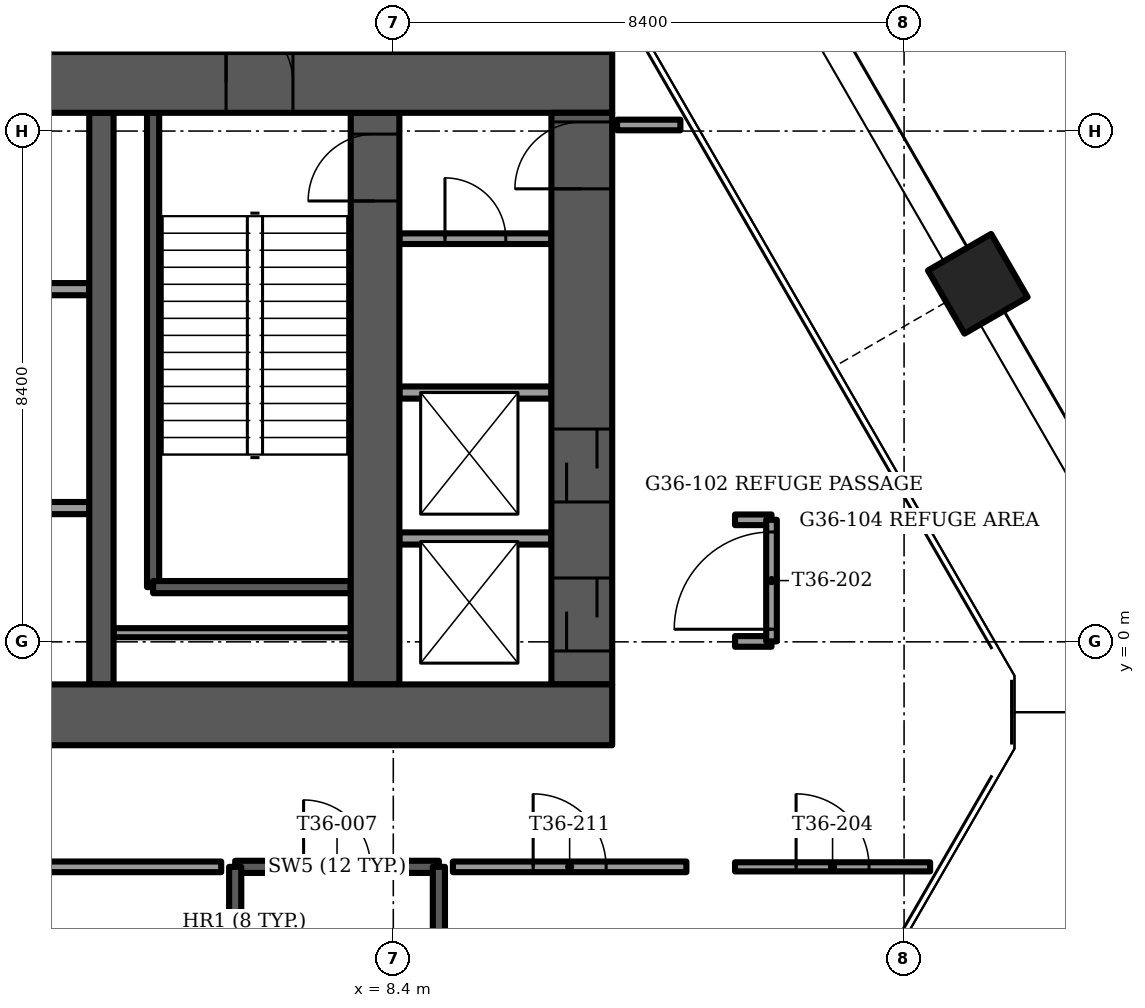
"""IFC4 building model, lengths in metres.
Left out: names, types, materials, properties, quantities, classifications, styles, units other than length and angle.
Written with IfcOpenShell. Run it as: python <this file> out.ifc"""

import sys

from ifc_helpers import new_model, si_unit, direction, frame, frame_2d, origin, origin_2d, place, context, subcontext, project, spatial, rectangle, extrude, element, fill, save


model = new_model("IFC4")
c1 = context("Model", 3, precision=1e-05, world=origin(), true_north=direction((0.0, 1.0)))
c2 = subcontext(c1, "Body", "Model", "MODEL_VIEW")
j1 = project(units=[si_unit("LENGTHUNIT", "METRE"), si_unit("PLANEANGLEUNIT", "RADIAN")], contexts=[c1])
p1 = place(None, origin())
s1 = spatial("IfcSite", under=j1, at=p1, CompositionType="ELEMENT")
p2 = place(p1, origin())
s2 = spatial("IfcBuilding", under=s1, at=p2, CompositionType="ELEMENT")
p3 = place(p2, frame((0.0, 0.0, 146.0)))
s3 = spatial("IfcBuildingStorey", under=s2, at=p3, CompositionType="ELEMENT", Elevation=146.0)
p4 = place(p3, frame((18.012, 5.888, -1.2), z_axis=(0.0, 0.0, 1.0), x_axis=(0.5, -0.866025403784, 0.0)))
e1 = element("IfcColumn", 1, at=p4, inside=s3, PredefinedType="COLUMN", context=c2, shape_type="SweptSolid", body=[
    extrude(rectangle(XDim=1.2, YDim=1.2, at=origin_2d()), origin(), (0.0, 0.0, 1.0), 5.0),
])
p5 = place(p3, frame((-12.0, -1.2, -0.3), z_axis=(0.0, 0.0, 1.0), x_axis=(1.0, 0.0, 0.0)))
e2 = element("IfcWall", 2, at=p5, inside=s3, PredefinedType="SHEAR", context=c2, shape_type="SweptSolid", body=[
    extrude(rectangle(XDim=24.0, YDim=1.0, at=frame_2d((12.0, 0.0))), origin(), (0.0, 0.0, 1.0), 5.0),
])
p6 = place(p5, frame((11.2, 0.0, 0.0)))
e3 = element("IfcOpeningElement", 3, at=p6, cuts=e2, PredefinedType="OPENING", context=c2, shape_type="SweptSolid", body=[
    extrude(rectangle(XDim=1.6, YDim=2.1, at=frame_2d((0.8, 1.05))), frame((0.0, 0.5, 0.0), z_axis=(0.0, -1.0, 0.0), x_axis=(1.0, 0.0, 0.0)), (0.0, 0.0, 1.0), 1.0),
])
p7 = place(p3, frame((-12.0, 9.2, -0.3), z_axis=(0.0, 0.0, 1.0), x_axis=(1.0, 0.0, 0.0)))
e4 = element("IfcWall", 4, at=p7, inside=s3, PredefinedType="SHEAR", context=c2, shape_type="SweptSolid", body=[
    extrude(rectangle(XDim=24.0, YDim=1.0, at=frame_2d((12.0, 0.0))), origin(), (0.0, 0.0, 1.0), 5.0),
])
p8 = place(p7, frame((11.2, 0.0, 0.0)))
e5 = element("IfcOpeningElement", 5, at=p8, cuts=e4, PredefinedType="OPENING", context=c2, shape_type="SweptSolid", body=[
    extrude(rectangle(XDim=1.6, YDim=2.1, at=frame_2d((0.8, 1.05))), frame((0.0, 0.5, 0.0), z_axis=(0.0, -1.0, 0.0), x_axis=(1.0, 0.0, 0.0)), (0.0, 0.0, 1.0), 1.0),
])
p9 = place(p7, frame((5.25, 0.0, 0.0)))
e6 = element("IfcOpeningElement", 6, at=p9, cuts=e4, PredefinedType="OPENING", context=c2, shape_type="SweptSolid", body=[
    extrude(rectangle(XDim=1.1, YDim=2.1, at=frame_2d((0.55, 1.05))), frame((0.0, 0.5, 0.0), z_axis=(0.0, -1.0, 0.0), x_axis=(1.0, 0.0, 0.0)), (0.0, 0.0, 1.0), 1.0),
])
p10 = place(p7, frame((17.65, 0.0, 0.0)))
e7 = element("IfcOpeningElement", 7, at=p10, cuts=e4, PredefinedType="OPENING", context=c2, shape_type="SweptSolid", body=[
    extrude(rectangle(XDim=1.1, YDim=2.1, at=frame_2d((0.55, 1.05))), frame((0.0, 0.5, 0.0), z_axis=(0.0, -1.0, 0.0), x_axis=(1.0, 0.0, 0.0)), (0.0, 0.0, 1.0), 1.0),
])
p11 = place(p3, frame((8.1, -0.7, -0.3), z_axis=(0.0, 0.0, 1.0), x_axis=(0.0, 1.0, 0.0)))
e8 = element("IfcWall", 8, at=p11, inside=s3, PredefinedType="SHEAR", context=c2, shape_type="SweptSolid", body=[
    extrude(rectangle(XDim=9.4, YDim=0.8, at=frame_2d((4.7, 0.0))), origin(), (0.0, 0.0, 1.0), 5.0),
])
p12 = place(p11, frame((7.95, 0.0, 0.0)))
e9 = element("IfcOpeningElement", 9, at=p12, cuts=e8, PredefinedType="OPENING", context=c2, shape_type="SweptSolid", body=[
    extrude(rectangle(XDim=1.1, YDim=2.1, at=frame_2d((0.55, 1.05))), frame((0.0, 0.4, 0.0), z_axis=(0.0, -1.0, 0.0), x_axis=(1.0, 0.0, 0.0)), (0.0, 0.0, 1.0), 0.8),
])
p13 = place(p3, frame((3.6, -0.7, -0.3), z_axis=(0.0, 0.0, 1.0), x_axis=(0.0, 1.0, 0.0)))
e10 = element("IfcWall", 10, at=p13, inside=s3, PredefinedType="SHEAR", context=c2, shape_type="SweptSolid", body=[
    extrude(rectangle(XDim=9.4, YDim=0.4, at=frame_2d((4.7, 0.0))), origin(), (0.0, 0.0, 1.0), 5.0),
])
p14 = place(p3, frame((11.5, -0.7, -0.3), z_axis=(0.0, 0.0, 1.0), x_axis=(0.0, 1.0, 0.0)))
e11 = element("IfcWall", 11, at=p14, inside=s3, PredefinedType="SHEAR", context=c2, shape_type="SweptSolid", body=[
    extrude(rectangle(XDim=9.4, YDim=1.0, at=frame_2d((4.7, 0.0))), origin(), (0.0, 0.0, 1.0), 5.0),
])
p15 = place(p14, frame((8.15, 0.0, 0.0)))
e12 = element("IfcOpeningElement", 12, at=p15, cuts=e11, PredefinedType="OPENING", context=c2, shape_type="SweptSolid", body=[
    extrude(rectangle(XDim=1.1, YDim=2.1, at=frame_2d((0.55, 1.05))), frame((0.0, 0.5, 0.0), z_axis=(0.0, -1.0, 0.0), x_axis=(1.0, 0.0, 0.0)), (0.0, 0.0, 1.0), 1.0),
])
p16 = place(p14, frame((0.55, 0.0, 0.0)))
e13 = element("IfcOpeningElement", 13, at=p16, cuts=e11, PredefinedType="OPENING", context=c2, shape_type="SweptSolid", body=[
    extrude(rectangle(XDim=1.2, YDim=2.1, at=frame_2d((0.6, 1.05))), frame((0.0, 0.5, 0.0), z_axis=(0.0, -1.0, 0.0), x_axis=(1.0, 0.0, 0.0)), (0.0, 0.0, 1.0), 1.0),
])
p17 = place(p14, frame((3.0, 0.0, 0.0)))
e14 = element("IfcOpeningElement", 14, at=p17, cuts=e11, PredefinedType="OPENING", context=c2, shape_type="SweptSolid", body=[
    extrude(rectangle(XDim=1.2, YDim=2.1, at=frame_2d((0.6, 1.05))), frame((0.0, 0.5, 0.0), z_axis=(0.0, -1.0, 0.0), x_axis=(1.0, 0.0, 0.0)), (0.0, 0.0, 1.0), 1.0),
])
for number, where, z_axis, x_axis in (
    (15, (1.1, 2.2, 0.0), (0.0, 0.0, 1.0), (1.0, 0.0, 0.0)),
    (16, (1.1, 5.8, 0.0), (0.0, 0.0, 1.0), (1.0, 0.0, 0.0)),
):
    element("IfcWall", number, at=place(p3, frame(where, z_axis=z_axis, x_axis=x_axis)), inside=s3, PredefinedType="PARTITIONING", context=c2, shape_type="SweptSolid", body=[
        extrude(rectangle(XDim=2.3, YDim=0.2, at=frame_2d((1.15, 0.0))), origin(), (0.0, 0.0, 1.0), 4.7),
    ])
p18 = place(p3, frame((4.45, 0.9, -0.3), z_axis=(0.0, 0.0, 1.0), x_axis=(0.0, 1.0, 0.0)))
e17 = element("IfcWall", 17, at=p18, inside=s3, PredefinedType="SOLIDWALL", context=c2, shape_type="SweptSolid", body=[
    extrude(rectangle(XDim=7.8, YDim=0.2, at=frame_2d((3.9, 0.0))), origin(), (0.0, 0.0, 1.0), 5.0),
])
p19 = place(p3, frame((4.45, 0.9, -0.3), z_axis=(0.0, 0.0, 1.0), x_axis=(1.0, 0.0, 0.0)))
e18 = element("IfcWall", 18, at=p19, inside=s3, PredefinedType="SOLIDWALL", context=c2, shape_type="SweptSolid", body=[
    extrude(rectangle(XDim=3.25, YDim=0.2, at=frame_2d((1.625, 0.0))), origin(), (0.0, 0.0, 1.0), 5.0),
])
p20 = place(p3, frame((3.8, 0.15, 0.0), z_axis=(0.0, 0.0, 1.0), x_axis=(1.0, 0.0, 0.0)))
e19 = element("IfcWall", 19, at=p20, inside=s3, PredefinedType="PARTITIONING", context=c2, shape_type="SweptSolid", body=[
    extrude(rectangle(XDim=3.9, YDim=0.15, at=frame_2d((1.95, 0.0))), origin(), (0.0, 0.0, 1.0), 4.7),
])
p21 = place(p3, frame((5.8, -3.7, -0.3), z_axis=(0.0, 0.0, 1.0), x_axis=(1.0, 0.0, 0.0)))
e20 = element("IfcWall", 20, at=p21, inside=s3, PredefinedType="SOLIDWALL", context=c2, shape_type="SweptSolid", body=[
    extrude(rectangle(XDim=3.35, YDim=0.2, at=frame_2d((1.675, 0.0))), origin(), (0.0, 0.0, 1.0), 5.0),
])
p22 = place(p21, frame((1.125, 0.0, 0.0)))
e21 = element("IfcOpeningElement", 21, at=p22, cuts=e20, PredefinedType="OPENING", context=c2, shape_type="SweptSolid", body=[
    extrude(rectangle(XDim=1.1, YDim=2.1, at=frame_2d((0.55, 1.05))), frame((0.0, 0.1, 0.0), z_axis=(0.0, -1.0, 0.0), x_axis=(1.0, 0.0, 0.0)), (0.0, 0.0, 1.0), 0.2),
])
for number, where, z_axis, x_axis in (
    (22, (5.8, -3.7, -0.3), (0.0, 0.0, 1.0), (0.0, -1.0, 0.0)),
    (23, (9.15, -3.7, -0.3), (0.0, 0.0, 1.0), (0.0, -1.0, 0.0)),
):
    element("IfcWall", number, at=place(p3, frame(where, z_axis=z_axis, x_axis=x_axis)), inside=s3, PredefinedType="SOLIDWALL", context=c2, shape_type="SweptSolid", body=[
        extrude(rectangle(XDim=7.7, YDim=0.2, at=frame_2d((3.85, 0.0))), origin(), (0.0, 0.0, 1.0), 5.0),
    ])
for number, where, z_axis, x_axis in (
    (24, (8.5, 1.7, 0.0), (0.0, 0.0, 1.0), (1.0, 0.0, 0.0)),
    (25, (8.5, 4.1, 0.0), (0.0, 0.0, 1.0), (1.0, 0.0, 0.0)),
):
    element("IfcWall", number, at=place(p3, frame(where, z_axis=z_axis, x_axis=x_axis)), inside=s3, PredefinedType="PARTITIONING", context=c2, shape_type="SweptSolid", body=[
        extrude(rectangle(XDim=2.5, YDim=0.2, at=frame_2d((1.25, 0.0))), origin(), (0.0, 0.0, 1.0), 4.7),
    ])
p23 = place(p3, frame((8.5, 6.63, 0.0), z_axis=(0.0, 0.0, 1.0), x_axis=(1.0, 0.0, 0.0)))
e26 = element("IfcWall", 26, at=p23, inside=s3, PredefinedType="PARTITIONING", context=c2, shape_type="SweptSolid", body=[
    extrude(rectangle(XDim=2.5, YDim=0.175, at=frame_2d((1.25, 0.0))), origin(), (0.0, 0.0, 1.0), 4.7),
])
p24 = place(p23, frame((0.75, 0.0, 0.0)))
e27 = element("IfcOpeningElement", 27, at=p24, cuts=e26, PredefinedType="OPENING", context=c2, shape_type="SweptSolid", body=[
    extrude(rectangle(XDim=1.0, YDim=2.1, at=frame_2d((0.5, 1.05))), frame((0.0, 0.087, 0.0), z_axis=(0.0, -1.0, 0.0), x_axis=(1.0, 0.0, 0.0)), (0.0, 0.0, 1.0), 0.175),
])
p25 = place(p3, frame((-5.57, -3.7, 0.0), z_axis=(0.0, 0.0, 1.0), x_axis=(1.0, 0.0, 0.0)))
e28 = element("IfcWall", 28, at=p25, inside=s3, PredefinedType="PARTITIONING", context=c2, shape_type="SweptSolid", body=[
    extrude(rectangle(XDim=11.14, YDim=0.175, at=frame_2d((5.57, 0.0))), origin(), (0.0, 0.0, 1.0), 4.7),
])
p26 = place(p25, frame((4.77, 0.0, 0.0)))
e29 = element("IfcOpeningElement", 29, at=p26, cuts=e28, PredefinedType="OPENING", context=c2, shape_type="SweptSolid", body=[
    extrude(rectangle(XDim=1.6, YDim=2.1, at=frame_2d((0.8, 1.05))), frame((0.0, 0.087, 0.0), z_axis=(0.0, -1.0, 0.0), x_axis=(1.0, 0.0, 0.0)), (0.0, 0.0, 1.0), 0.175),
])
p27 = place(p3, frame((9.38, -3.7, 0.0), z_axis=(0.0, 0.0, 1.0), x_axis=(1.0, 0.0, 0.0)))
e30 = element("IfcWall", 30, at=p27, inside=s3, PredefinedType="PARTITIONING", context=c2, shape_type="SweptSolid", body=[
    extrude(rectangle(XDim=3.84, YDim=0.175, at=frame_2d((1.92, 0.0))), origin(), (0.0, 0.0, 1.0), 4.7),
])
p28 = place(p27, frame((1.32, 0.0, 0.0)))
e31 = element("IfcOpeningElement", 31, at=p28, cuts=e30, PredefinedType="OPENING", context=c2, shape_type="SweptSolid", body=[
    extrude(rectangle(XDim=1.2, YDim=2.1, at=frame_2d((0.6, 1.05))), frame((0.0, 0.087, 0.0), z_axis=(0.0, -1.0, 0.0), x_axis=(1.0, 0.0, 0.0)), (0.0, 0.0, 1.0), 0.175),
])
for number, where, z_axis, x_axis in (
    (32, (14.02, 0.007, 0.0), (0.0, 0.0, 1.0), (1.0, 0.0, 0.0)),
    (33, (14.02, 2.007, 0.0), (0.0, 0.0, 1.0), (1.0, 0.0, 0.0)),
):
    element("IfcWall", number, at=place(p3, frame(where, z_axis=z_axis, x_axis=x_axis)), inside=s3, PredefinedType="PARTITIONING", context=c2, shape_type="SweptSolid", body=[
        extrude(rectangle(XDim=0.6, YDim=0.175, at=frame_2d((0.3, 0.0))), origin(), (0.0, 0.0, 1.0), 4.7),
    ])
p29 = place(p3, frame((12.08, 8.5, 0.0), z_axis=(0.0, 0.0, 1.0), x_axis=(1.0, 0.0, 0.0)))
e34 = element("IfcWall", 34, at=p29, inside=s3, PredefinedType="PARTITIONING", context=c2, shape_type="SweptSolid", body=[
    extrude(rectangle(XDim=1.042, YDim=0.175, at=frame_2d((0.521, 0.0))), origin(), (0.0, 0.0, 1.0), 4.7),
])
p30 = place(p3, frame((14.62, 0.007, 0.0), z_axis=(0.0, 0.0, 1.0), x_axis=(0.0, 1.0, 0.0)))
e35 = element("IfcWall", 35, at=p30, inside=s3, PredefinedType="PARTITIONING", context=c2, shape_type="SweptSolid", body=[
    extrude(rectangle(XDim=2.0, YDim=0.175, at=frame_2d((1.0, 0.0))), origin(), (0.0, 0.0, 1.0), 4.7),
])
p31 = place(p30, frame((0.2, 0.0, 0.0)))
e36 = element("IfcOpeningElement", 36, at=p31, cuts=e35, PredefinedType="OPENING", context=c2, shape_type="SweptSolid", body=[
    extrude(rectangle(XDim=1.6, YDim=2.1, at=frame_2d((0.8, 1.05))), frame((0.0, 0.087, 0.0), z_axis=(0.0, -1.0, 0.0), x_axis=(1.0, 0.0, 0.0)), (0.0, 0.0, 1.0), 0.175),
])
p32 = place(p3, frame((14.02, -3.7, 0.0), z_axis=(0.0, 0.0, 1.0), x_axis=(1.0, 0.0, 0.0)))
e37 = element("IfcWall", 37, at=p32, inside=s3, PredefinedType="PARTITIONING", context=c2, shape_type="SweptSolid", body=[
    extrude(rectangle(XDim=3.208, YDim=0.15, at=frame_2d((1.604, 0.0))), origin(), (0.0, 0.0, 1.0), 4.7),
])
p33 = place(p32, frame((1.004, 0.0, 0.0)))
e38 = element("IfcOpeningElement", 38, at=p33, cuts=e37, PredefinedType="OPENING", context=c2, shape_type="SweptSolid", body=[
    extrude(rectangle(XDim=1.2, YDim=2.1, at=frame_2d((0.6, 1.05))), frame((0.0, 0.075, 0.0), z_axis=(0.0, -1.0, 0.0), x_axis=(1.0, 0.0, 0.0)), (0.0, 0.0, 1.0), 0.15),
])
p34 = place(p10, origin())
e39 = element("IfcDoor", 39, at=p34, inside=s3, OperationType="SINGLE_SWING_RIGHT", PredefinedType="DOOR", context=c2, shape_type="SweptSolid", body=[
    extrude(rectangle(XDim=1.1, YDim=2.1, at=frame_2d((0.55, 1.05))), frame((0.0, 0.025, 0.0), z_axis=(0.0, -1.0, 0.0), x_axis=(1.0, 0.0, 0.0)), (0.0, 0.0, 1.0), 0.05),
])
fill(e7, e39)
p35 = place(p12, origin())
e40 = element("IfcDoor", 40, at=p35, inside=s3, OperationType="SINGLE_SWING_LEFT", PredefinedType="DOOR", context=c2, shape_type="SweptSolid", body=[
    extrude(rectangle(XDim=1.1, YDim=2.1, at=frame_2d((0.55, 1.05))), frame((0.0, 0.025, 0.0), z_axis=(0.0, -1.0, 0.0), x_axis=(1.0, 0.0, 0.0)), (0.0, 0.0, 1.0), 0.05),
])
fill(e9, e40)
p36 = place(p22, origin())
e41 = element("IfcDoor", 41, at=p36, inside=s3, OperationType="SINGLE_SWING_LEFT", PredefinedType="DOOR", context=c2, shape_type="SweptSolid", body=[
    extrude(rectangle(XDim=1.1, YDim=2.1, at=frame_2d((0.55, 1.05))), frame((0.0, 0.025, 0.0), z_axis=(0.0, -1.0, 0.0), x_axis=(1.0, 0.0, 0.0)), (0.0, 0.0, 1.0), 0.05),
])
fill(e21, e41)
p37 = place(p24, origin())
e42 = element("IfcDoor", 42, at=p37, inside=s3, OperationType="SINGLE_SWING_RIGHT", PredefinedType="DOOR", context=c2, shape_type="SweptSolid", body=[
    extrude(rectangle(XDim=1.0, YDim=2.1, at=frame_2d((0.5, 1.05))), frame((0.0, 0.025, 0.0), z_axis=(0.0, -1.0, 0.0), x_axis=(1.0, 0.0, 0.0)), (0.0, 0.0, 1.0), 0.05),
])
fill(e27, e42)
p38 = place(p15, origin())
e43 = element("IfcDoor", 43, at=p38, inside=s3, OperationType="SINGLE_SWING_RIGHT", PredefinedType="DOOR", context=c2, shape_type="SweptSolid", body=[
    extrude(rectangle(XDim=1.1, YDim=2.1, at=frame_2d((0.55, 1.05))), frame((0.0, 0.025, 0.0), z_axis=(0.0, -1.0, 0.0), x_axis=(1.0, 0.0, 0.0)), (0.0, 0.0, 1.0), 0.05),
])
fill(e12, e43)
p39 = place(p16, origin())
e44 = element("IfcDoor", 44, at=p39, inside=s3, OperationType="SLIDING_TO_LEFT", PredefinedType="DOOR", context=c2, shape_type="SweptSolid", body=[
    extrude(rectangle(XDim=1.2, YDim=2.1, at=frame_2d((0.6, 1.05))), frame((0.0, 0.025, 0.0), z_axis=(0.0, -1.0, 0.0), x_axis=(1.0, 0.0, 0.0)), (0.0, 0.0, 1.0), 0.05),
])
fill(e13, e44)
p40 = place(p17, origin())
e45 = element("IfcDoor", 45, at=p40, inside=s3, OperationType="SLIDING_TO_LEFT", PredefinedType="DOOR", context=c2, shape_type="SweptSolid", body=[
    extrude(rectangle(XDim=1.2, YDim=2.1, at=frame_2d((0.6, 1.05))), frame((0.0, 0.025, 0.0), z_axis=(0.0, -1.0, 0.0), x_axis=(1.0, 0.0, 0.0)), (0.0, 0.0, 1.0), 0.05),
])
fill(e14, e45)
p41 = place(p31, origin())
e46 = element("IfcDoor", 46, at=p41, inside=s3, OperationType="DOUBLE_DOOR_SINGLE_SWING", PredefinedType="DOOR", context=c2, shape_type="SweptSolid", body=[
    extrude(rectangle(XDim=1.6, YDim=2.1, at=frame_2d((0.8, 1.05))), frame((0.0, 0.025, 0.0), z_axis=(0.0, -1.0, 0.0), x_axis=(1.0, 0.0, 0.0)), (0.0, 0.0, 1.0), 0.05),
])
fill(e36, e46)
p42 = place(p33, origin())
e47 = element("IfcDoor", 47, at=p42, inside=s3, OperationType="SINGLE_SWING_RIGHT", PredefinedType="DOOR", context=c2, shape_type="SweptSolid", body=[
    extrude(rectangle(XDim=1.2, YDim=2.1, at=frame_2d((0.6, 1.05))), frame((0.0, 0.025, 0.0), z_axis=(0.0, -1.0, 0.0), x_axis=(1.0, 0.0, 0.0)), (0.0, 0.0, 1.0), 0.05),
])
fill(e38, e47)
p43 = place(p28, origin())
e48 = element("IfcDoor", 48, at=p43, inside=s3, OperationType="SINGLE_SWING_LEFT", PredefinedType="DOOR", context=c2, shape_type="SweptSolid", body=[
    extrude(rectangle(XDim=1.2, YDim=2.1, at=frame_2d((0.6, 1.05))), frame((0.0, 0.025, 0.0), z_axis=(0.0, -1.0, 0.0), x_axis=(1.0, 0.0, 0.0)), (0.0, 0.0, 1.0), 0.05),
])
fill(e31, e48)
save(model, sys.argv[1])
